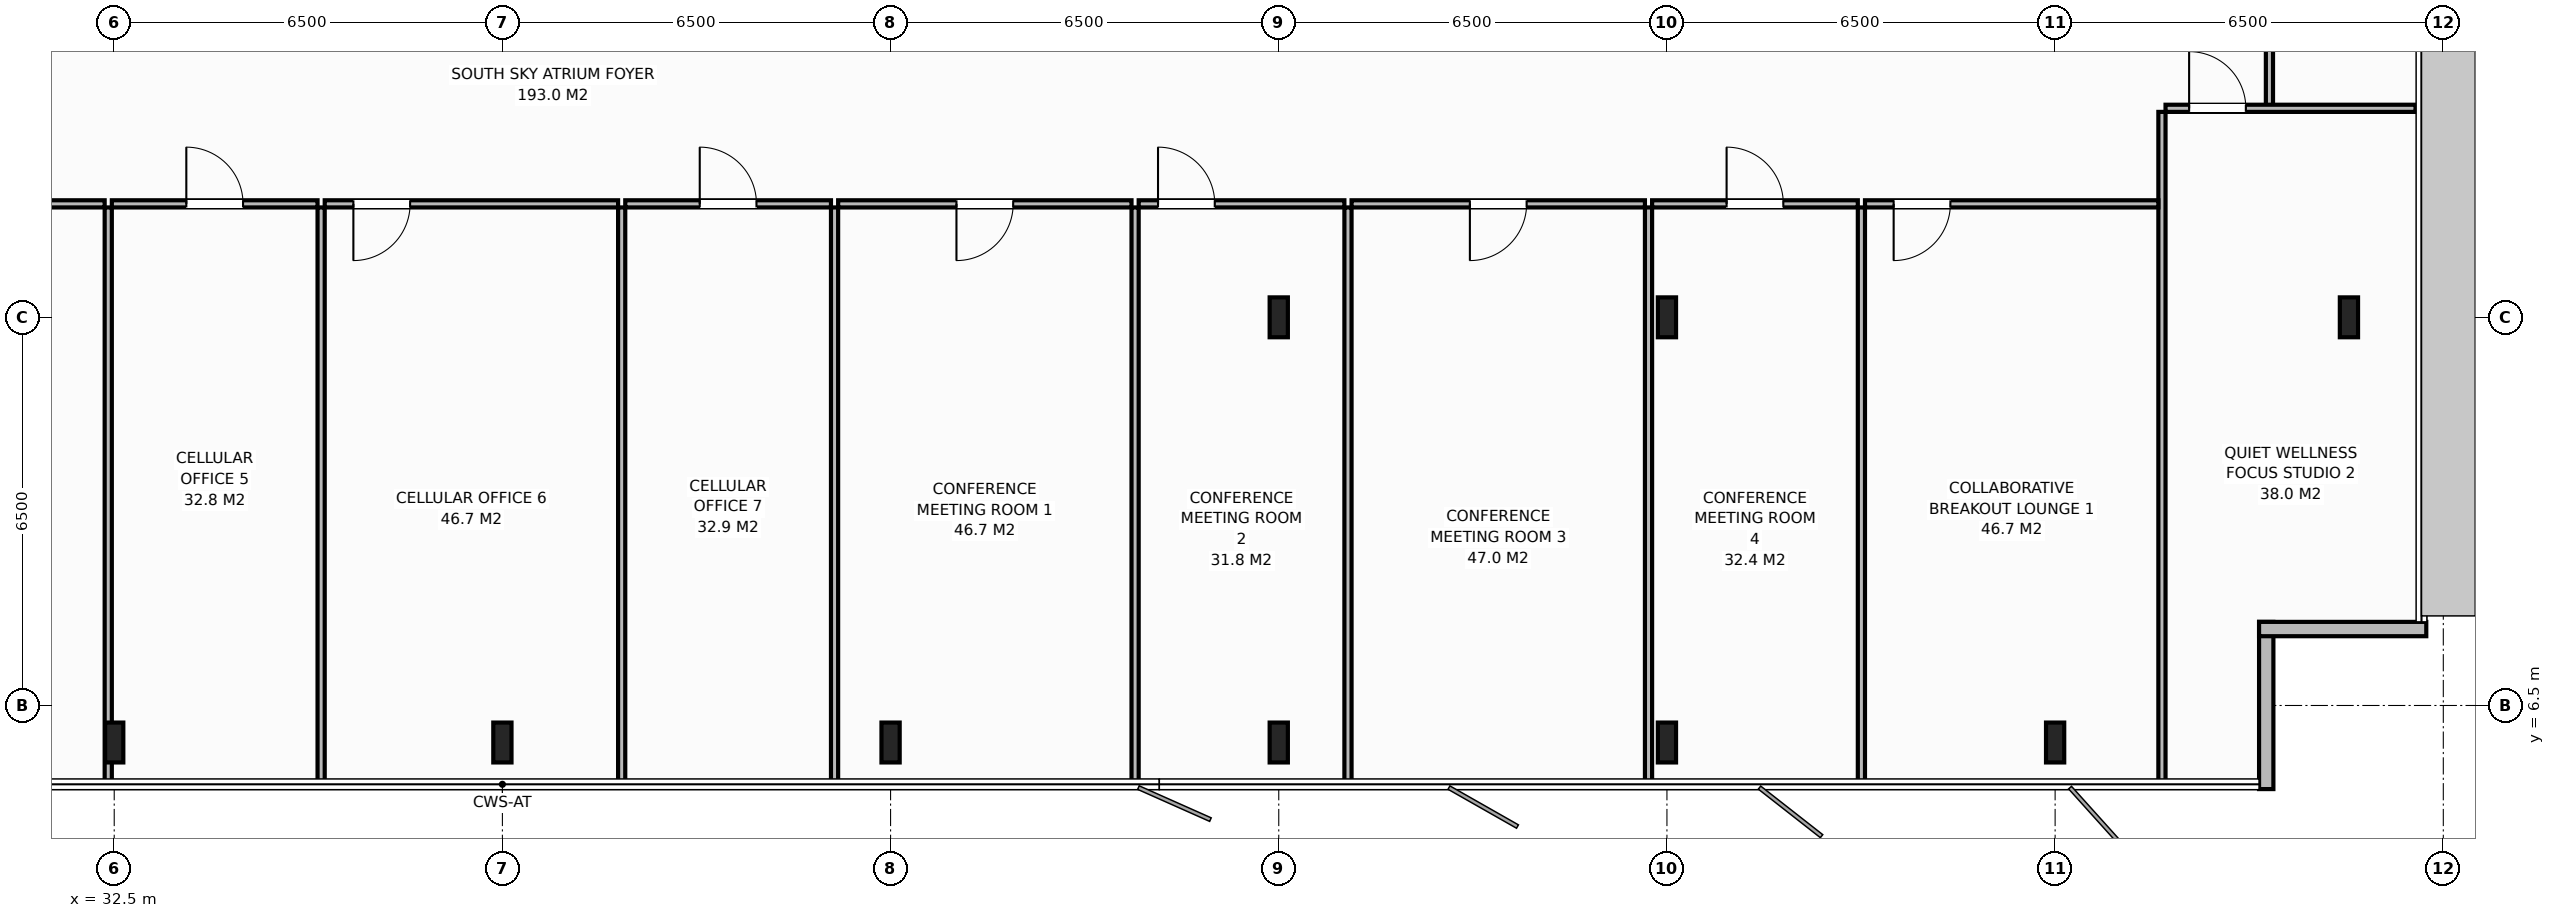
"""IFC4 building model, lengths in metres.
Left out: names, types, materials, properties, quantities, classifications, styles, units other than length and angle.
Written with IfcOpenShell. Run it as: python <this file> out.ifc"""

import sys

from ifc_helpers import new_model, si_unit, direction, frame, frame_2d, origin, origin_2d, place, context, subcontext, project, spatial, rectangle, i_section, extrude, element, fill, save


model = new_model("IFC4")
c1 = context("Model", 3, precision=1e-05, world=origin(), true_north=direction((0.0, 1.0)))
c2 = subcontext(c1, "Body", "Model", "MODEL_VIEW")
j1 = project(units=[si_unit("LENGTHUNIT", "METRE"), si_unit("PLANEANGLEUNIT", "RADIAN")], contexts=[c1])
p1 = place(None, origin())
s1 = spatial("IfcSite", under=j1, at=p1, CompositionType="ELEMENT")
p2 = place(p1, origin())
s2 = spatial("IfcBuilding", under=s1, at=p2, CompositionType="ELEMENT")
p3 = place(p2, frame((0.0, 0.0, 267.0)))
s3 = spatial("IfcBuildingStorey", under=s2, at=p3, CompositionType="ELEMENT", Elevation=267.0)
for number, where, z_axis, x_axis in (
    (1, (58.5, 13.0, 0.0), (0.0, 0.0, 1.0), (1.0, 0.0, 0.0)),
    (2, (52.0, 13.0, 0.0), (0.0, 0.0, 1.0), (1.0, 0.0, 0.0)),
    (3, (32.5, 5.88, 0.0), (0.0, 0.0, 1.0), (1.0, 0.0, 0.0)),
    (4, (39.0, 5.88, 0.0), (0.0, 0.0, 1.0), (1.0, 0.0, 0.0)),
    (5, (45.5, 5.88, 0.0), (0.0, 0.0, 1.0), (1.0, 0.0, 0.0)),
    (6, (52.0, 5.88, 0.0), (0.0, 0.0, 1.0), (1.0, 0.0, 0.0)),
    (7, (58.5, 5.88, 0.0), (0.0, 0.0, 1.0), (1.0, 0.0, 0.0)),
    (8, (65.0, 5.88, 0.0), (0.0, 0.0, 1.0), (1.0, 0.0, 0.0)),
    (9, (69.92, 13.0, 0.0), (0.0, 0.0, 1.0), (1.0, 0.0, 0.0)),
):
    element("IfcColumn", number, at=place(p3, frame(where, z_axis=z_axis, x_axis=x_axis)), inside=s3, PredefinedType="COLUMN", context=c2, shape_type="SweptSolid", body=[
        extrude(i_section(OverallWidth=0.305, OverallDepth=0.668, WebThickness=0.021, FlangeThickness=0.04, at=origin_2d()), origin(), (0.0, 0.0, 1.0), 3.8),
    ])
p4 = place(p3, frame((68.535, 7.9, 0.0), z_axis=(0.0, 0.0, 1.0), x_axis=(0.0, -1.0, 0.0)))
e10 = element("IfcWall", 10, at=p4, inside=s3, PredefinedType="STANDARD", context=c2, shape_type="SweptSolid", body=[
    extrude(rectangle(XDim=2.8, YDim=0.24, at=frame_2d((1.4, 0.0))), origin(), (0.0, 0.0, 1.0), 3.588),
])
p5 = place(p3, frame((71.215, 7.78, 0.0), z_axis=(0.0, 0.0, 1.0), x_axis=(-1.0, 0.0, 0.0)))
e11 = element("IfcWall", 11, at=p5, inside=s3, PredefinedType="STANDARD", context=c2, shape_type="SweptSolid", body=[
    extrude(rectangle(XDim=2.8, YDim=0.24, at=frame_2d((1.4, 0.0))), origin(), (0.0, 0.0, 1.0), 3.588),
])
p6 = place(p3, frame((68.589, 16.5, 0.0), z_axis=(0.0, 0.0, 1.0), x_axis=(0.0, 1.0, 0.0)))
e12 = element("IfcWall", 12, at=p6, inside=s3, PredefinedType="PARTITIONING", context=c2, shape_type="SweptSolid", body=[
    extrude(rectangle(XDim=2.1, YDim=0.12, at=frame_2d((1.05, 0.0))), origin(), (0.0, 0.0, 1.0), 3.588),
])
p7 = place(p3, frame((32.4, 5.12, 0.0), z_axis=(0.0, 0.0, 1.0), x_axis=(0.0, 1.0, 0.0)))
e13 = element("IfcWall", 13, at=p7, inside=s3, PredefinedType="PARTITIONING", context=c2, shape_type="SweptSolid", body=[
    extrude(rectangle(XDim=9.72, YDim=0.12, at=frame_2d((4.86, 0.0))), origin(), (0.0, 0.0, 1.0), 2.788),
])
p8 = place(p3, frame((26.42, 14.9, 0.0), z_axis=(0.0, 0.0, 1.0), x_axis=(1.0, 0.0, 0.0)))
e14 = element("IfcWall", 14, at=p8, inside=s3, PredefinedType="PARTITIONING", context=c2, shape_type="SweptSolid", body=[
    extrude(rectangle(XDim=5.92, YDim=0.12, at=frame_2d((2.96, 0.0))), origin(), (0.0, 0.0, 1.0), 3.588),
])
p9 = place(p8, frame((2.485, 0.0, 0.0)))
e15 = element("IfcOpeningElement", 15, at=p9, cuts=e14, PredefinedType="OPENING", context=c2, shape_type="SweptSolid", body=[
    extrude(rectangle(XDim=0.95, YDim=2.15, at=frame_2d((0.475, 1.075))), frame((0.0, 0.07, 0.0), z_axis=(0.0, -1.0, 0.0), x_axis=(1.0, 0.0, 0.0)), (0.0, 0.0, 1.0), 0.14),
])
p10 = place(p3, frame((35.965, 5.12, 0.0), z_axis=(0.0, 0.0, 1.0), x_axis=(0.0, 1.0, 0.0)))
e16 = element("IfcWall", 16, at=p10, inside=s3, PredefinedType="PARTITIONING", context=c2, shape_type="SweptSolid", body=[
    extrude(rectangle(XDim=9.72, YDim=0.12, at=frame_2d((4.86, 0.0))), origin(), (0.0, 0.0, 1.0), 3.588),
])
p11 = place(p3, frame((32.46, 14.9, 0.0), z_axis=(0.0, 0.0, 1.0), x_axis=(1.0, 0.0, 0.0)))
e17 = element("IfcWall", 17, at=p11, inside=s3, PredefinedType="PARTITIONING", context=c2, shape_type="SweptSolid", body=[
    extrude(rectangle(XDim=3.445, YDim=0.12, at=frame_2d((1.722, 0.0))), origin(), (0.0, 0.0, 1.0), 3.588),
])
p12 = place(p11, frame((1.247, 0.0, 0.0)))
e18 = element("IfcOpeningElement", 18, at=p12, cuts=e17, PredefinedType="OPENING", context=c2, shape_type="SweptSolid", body=[
    extrude(rectangle(XDim=0.95, YDim=2.15, at=frame_2d((0.475, 1.075))), frame((0.0, 0.07, 0.0), z_axis=(0.0, -1.0, 0.0), x_axis=(1.0, 0.0, 0.0)), (0.0, 0.0, 1.0), 0.14),
])
p13 = place(p3, frame((40.997, 5.12, 0.0), z_axis=(0.0, 0.0, 1.0), x_axis=(0.0, 1.0, 0.0)))
e19 = element("IfcWall", 19, at=p13, inside=s3, PredefinedType="PARTITIONING", context=c2, shape_type="SweptSolid", body=[
    extrude(rectangle(XDim=9.72, YDim=0.12, at=frame_2d((4.86, 0.0))), origin(), (0.0, 0.0, 1.0), 3.588),
])
p14 = place(p3, frame((36.025, 14.9, 0.0), z_axis=(0.0, 0.0, 1.0), x_axis=(1.0, 0.0, 0.0)))
e20 = element("IfcWall", 20, at=p14, inside=s3, PredefinedType="PARTITIONING", context=c2, shape_type="SweptSolid", body=[
    extrude(rectangle(XDim=4.913, YDim=0.12, at=frame_2d((2.456, 0.0))), origin(), (0.0, 0.0, 1.0), 3.588),
])
p15 = place(p14, frame((0.48, 0.0, 0.0)))
e21 = element("IfcOpeningElement", 21, at=p15, cuts=e20, PredefinedType="OPENING", context=c2, shape_type="SweptSolid", body=[
    extrude(rectangle(XDim=0.95, YDim=2.15, at=frame_2d((0.475, 1.075))), frame((0.0, 0.07, 0.0), z_axis=(0.0, -1.0, 0.0), x_axis=(1.0, 0.0, 0.0)), (0.0, 0.0, 1.0), 0.14),
])
p16 = place(p3, frame((44.562, 5.12, 0.0), z_axis=(0.0, 0.0, 1.0), x_axis=(0.0, 1.0, 0.0)))
e22 = element("IfcWall", 22, at=p16, inside=s3, PredefinedType="PARTITIONING", context=c2, shape_type="SweptSolid", body=[
    extrude(rectangle(XDim=9.72, YDim=0.12, at=frame_2d((4.86, 0.0))), origin(), (0.0, 0.0, 1.0), 3.588),
])
p17 = place(p3, frame((41.057, 14.9, 0.0), z_axis=(0.0, 0.0, 1.0), x_axis=(1.0, 0.0, 0.0)))
e23 = element("IfcWall", 23, at=p17, inside=s3, PredefinedType="PARTITIONING", context=c2, shape_type="SweptSolid", body=[
    extrude(rectangle(XDim=3.445, YDim=0.12, at=frame_2d((1.722, 0.0))), origin(), (0.0, 0.0, 1.0), 3.588),
])
p18 = place(p17, frame((1.247, 0.0, 0.0)))
e24 = element("IfcOpeningElement", 24, at=p18, cuts=e23, PredefinedType="OPENING", context=c2, shape_type="SweptSolid", body=[
    extrude(rectangle(XDim=0.95, YDim=2.15, at=frame_2d((0.475, 1.075))), frame((0.0, 0.07, 0.0), z_axis=(0.0, -1.0, 0.0), x_axis=(1.0, 0.0, 0.0)), (0.0, 0.0, 1.0), 0.14),
])
p19 = place(p3, frame((49.594, 5.12, 0.0), z_axis=(0.0, 0.0, 1.0), x_axis=(0.0, 1.0, 0.0)))
e25 = element("IfcWall", 25, at=p19, inside=s3, PredefinedType="PARTITIONING", context=c2, shape_type="SweptSolid", body=[
    extrude(rectangle(XDim=9.72, YDim=0.12, at=frame_2d((4.86, 0.0))), origin(), (0.0, 0.0, 1.0), 3.588),
])
p20 = place(p3, frame((44.622, 14.9, 0.0), z_axis=(0.0, 0.0, 1.0), x_axis=(1.0, 0.0, 0.0)))
e26 = element("IfcWall", 26, at=p20, inside=s3, PredefinedType="PARTITIONING", context=c2, shape_type="SweptSolid", body=[
    extrude(rectangle(XDim=4.913, YDim=0.12, at=frame_2d((2.456, 0.0))), origin(), (0.0, 0.0, 1.0), 3.588),
])
p21 = place(p20, frame((1.981, 0.0, 0.0)))
e27 = element("IfcOpeningElement", 27, at=p21, cuts=e26, PredefinedType="OPENING", context=c2, shape_type="SweptSolid", body=[
    extrude(rectangle(XDim=0.95, YDim=2.15, at=frame_2d((0.475, 1.075))), frame((0.0, 0.07, 0.0), z_axis=(0.0, -1.0, 0.0), x_axis=(1.0, 0.0, 0.0)), (0.0, 0.0, 1.0), 0.14),
])
p22 = place(p3, frame((53.159, 5.12, 0.0), z_axis=(0.0, 0.0, 1.0), x_axis=(0.0, 1.0, 0.0)))
e28 = element("IfcWall", 28, at=p22, inside=s3, PredefinedType="PARTITIONING", context=c2, shape_type="SweptSolid", body=[
    extrude(rectangle(XDim=9.72, YDim=0.12, at=frame_2d((4.86, 0.0))), origin(), (0.0, 0.0, 1.0), 3.588),
])
p23 = place(p3, frame((49.654, 14.9, 0.0), z_axis=(0.0, 0.0, 1.0), x_axis=(1.0, 0.0, 0.0)))
e29 = element("IfcWall", 29, at=p23, inside=s3, PredefinedType="PARTITIONING", context=c2, shape_type="SweptSolid", body=[
    extrude(rectangle(XDim=3.445, YDim=0.12, at=frame_2d((1.722, 0.0))), origin(), (0.0, 0.0, 1.0), 3.588),
])
p24 = place(p23, frame((0.324, 0.0, 0.0)))
e30 = element("IfcOpeningElement", 30, at=p24, cuts=e29, PredefinedType="OPENING", context=c2, shape_type="SweptSolid", body=[
    extrude(rectangle(XDim=0.95, YDim=2.15, at=frame_2d((0.475, 1.075))), frame((0.0, 0.07, 0.0), z_axis=(0.0, -1.0, 0.0), x_axis=(1.0, 0.0, 0.0)), (0.0, 0.0, 1.0), 0.14),
])
p25 = place(p3, frame((58.192, 5.12, 0.0), z_axis=(0.0, 0.0, 1.0), x_axis=(0.0, 1.0, 0.0)))
e31 = element("IfcWall", 31, at=p25, inside=s3, PredefinedType="PARTITIONING", context=c2, shape_type="SweptSolid", body=[
    extrude(rectangle(XDim=9.72, YDim=0.12, at=frame_2d((4.86, 0.0))), origin(), (0.0, 0.0, 1.0), 3.588),
])
p26 = place(p3, frame((53.219, 14.9, 0.0), z_axis=(0.0, 0.0, 1.0), x_axis=(1.0, 0.0, 0.0)))
e32 = element("IfcWall", 32, at=p26, inside=s3, PredefinedType="PARTITIONING", context=c2, shape_type="SweptSolid", body=[
    extrude(rectangle(XDim=4.913, YDim=0.12, at=frame_2d((2.456, 0.0))), origin(), (0.0, 0.0, 1.0), 3.588),
])
p27 = place(p26, frame((1.981, 0.0, 0.0)))
e33 = element("IfcOpeningElement", 33, at=p27, cuts=e32, PredefinedType="OPENING", context=c2, shape_type="SweptSolid", body=[
    extrude(rectangle(XDim=0.95, YDim=2.15, at=frame_2d((0.475, 1.075))), frame((0.0, 0.07, 0.0), z_axis=(0.0, -1.0, 0.0), x_axis=(1.0, 0.0, 0.0)), (0.0, 0.0, 1.0), 0.14),
])
p28 = place(p3, frame((61.756, 5.12, 0.0), z_axis=(0.0, 0.0, 1.0), x_axis=(0.0, 1.0, 0.0)))
e34 = element("IfcWall", 34, at=p28, inside=s3, PredefinedType="PARTITIONING", context=c2, shape_type="SweptSolid", body=[
    extrude(rectangle(XDim=9.72, YDim=0.12, at=frame_2d((4.86, 0.0))), origin(), (0.0, 0.0, 1.0), 3.588),
])
p29 = place(p3, frame((58.252, 14.9, 0.0), z_axis=(0.0, 0.0, 1.0), x_axis=(1.0, 0.0, 0.0)))
e35 = element("IfcWall", 35, at=p29, inside=s3, PredefinedType="PARTITIONING", context=c2, shape_type="SweptSolid", body=[
    extrude(rectangle(XDim=3.445, YDim=0.12, at=frame_2d((1.722, 0.0))), origin(), (0.0, 0.0, 1.0), 3.588),
])
p30 = place(p29, frame((1.247, 0.0, 0.0)))
e36 = element("IfcOpeningElement", 36, at=p30, cuts=e35, PredefinedType="OPENING", context=c2, shape_type="SweptSolid", body=[
    extrude(rectangle(XDim=0.95, YDim=2.15, at=frame_2d((0.475, 1.075))), frame((0.0, 0.07, 0.0), z_axis=(0.0, -1.0, 0.0), x_axis=(1.0, 0.0, 0.0)), (0.0, 0.0, 1.0), 0.14),
])
p31 = place(p3, frame((66.789, 5.12, 0.0), z_axis=(0.0, 0.0, 1.0), x_axis=(0.0, 1.0, 0.0)))
e37 = element("IfcWall", 37, at=p31, inside=s3, PredefinedType="PARTITIONING", context=c2, shape_type="SweptSolid", body=[
    extrude(rectangle(XDim=11.32, YDim=0.12, at=frame_2d((5.66, 0.0))), origin(), (0.0, 0.0, 1.0), 3.588),
])
p32 = place(p3, frame((61.816, 14.9, 0.0), z_axis=(0.0, 0.0, 1.0), x_axis=(1.0, 0.0, 0.0)))
e38 = element("IfcWall", 38, at=p32, inside=s3, PredefinedType="PARTITIONING", context=c2, shape_type="SweptSolid", body=[
    extrude(rectangle(XDim=4.912, YDim=0.12, at=frame_2d((2.456, 0.0))), origin(), (0.0, 0.0, 1.0), 3.588),
])
p33 = place(p32, frame((0.48, 0.0, 0.0)))
e39 = element("IfcOpeningElement", 39, at=p33, cuts=e38, PredefinedType="OPENING", context=c2, shape_type="SweptSolid", body=[
    extrude(rectangle(XDim=0.95, YDim=2.15, at=frame_2d((0.475, 1.075))), frame((0.0, 0.07, 0.0), z_axis=(0.0, -1.0, 0.0), x_axis=(1.0, 0.0, 0.0)), (0.0, 0.0, 1.0), 0.14),
])
p34 = place(p3, frame((66.849, 16.5, 0.0), z_axis=(0.0, 0.0, 1.0), x_axis=(1.0, 0.0, 0.0)))
e40 = element("IfcWall", 40, at=p34, inside=s3, PredefinedType="PARTITIONING", context=c2, shape_type="SweptSolid", body=[
    extrude(rectangle(XDim=4.186, YDim=0.12, at=frame_2d((2.093, 0.0))), origin(), (0.0, 0.0, 1.0), 3.588),
])
p35 = place(p34, frame((0.395, 0.0, 0.0)))
e41 = element("IfcOpeningElement", 41, at=p35, cuts=e40, PredefinedType="OPENING", context=c2, shape_type="SweptSolid", body=[
    extrude(rectangle(XDim=0.95, YDim=2.15, at=frame_2d((0.475, 1.075))), frame((0.0, 0.07, 0.0), z_axis=(0.0, -1.0, 0.0), x_axis=(1.0, 0.0, 0.0)), (0.0, 0.0, 1.0), 0.14),
])
p36 = place(p12, origin())
e42 = element("IfcDoor", 42, at=p36, inside=s3, OperationType="SINGLE_SWING_LEFT", PredefinedType="DOOR", context=c2, shape_type="SweptSolid", body=[
    extrude(rectangle(XDim=0.95, YDim=2.15, at=frame_2d((0.475, 1.075))), frame((0.0, 0.025, 0.0), z_axis=(0.0, -1.0, 0.0), x_axis=(1.0, 0.0, 0.0)), (0.0, 0.0, 1.0), 0.05),
])
fill(e18, e42)
p37 = place(p15, origin())
e43 = element("IfcDoor", 43, at=p37, inside=s3, OperationType="SINGLE_SWING_RIGHT", PredefinedType="DOOR", context=c2, shape_type="SweptSolid", body=[
    extrude(rectangle(XDim=0.95, YDim=2.15, at=frame_2d((0.475, 1.075))), frame((0.0, 0.025, 0.0), z_axis=(0.0, -1.0, 0.0), x_axis=(1.0, 0.0, 0.0)), (0.0, 0.0, 1.0), 0.05),
])
fill(e21, e43)
p38 = place(p18, origin())
e44 = element("IfcDoor", 44, at=p38, inside=s3, OperationType="SINGLE_SWING_LEFT", PredefinedType="DOOR", context=c2, shape_type="SweptSolid", body=[
    extrude(rectangle(XDim=0.95, YDim=2.15, at=frame_2d((0.475, 1.075))), frame((0.0, 0.025, 0.0), z_axis=(0.0, -1.0, 0.0), x_axis=(1.0, 0.0, 0.0)), (0.0, 0.0, 1.0), 0.05),
])
fill(e24, e44)
p39 = place(p21, origin())
e45 = element("IfcDoor", 45, at=p39, inside=s3, OperationType="SINGLE_SWING_RIGHT", PredefinedType="DOOR", context=c2, shape_type="SweptSolid", body=[
    extrude(rectangle(XDim=0.95, YDim=2.15, at=frame_2d((0.475, 1.075))), frame((0.0, 0.025, 0.0), z_axis=(0.0, -1.0, 0.0), x_axis=(1.0, 0.0, 0.0)), (0.0, 0.0, 1.0), 0.05),
])
fill(e27, e45)
p40 = place(p24, origin())
e46 = element("IfcDoor", 46, at=p40, inside=s3, OperationType="SINGLE_SWING_LEFT", PredefinedType="DOOR", context=c2, shape_type="SweptSolid", body=[
    extrude(rectangle(XDim=0.95, YDim=2.15, at=frame_2d((0.475, 1.075))), frame((0.0, 0.025, 0.0), z_axis=(0.0, -1.0, 0.0), x_axis=(1.0, 0.0, 0.0)), (0.0, 0.0, 1.0), 0.05),
])
fill(e30, e46)
p41 = place(p27, origin())
e47 = element("IfcDoor", 47, at=p41, inside=s3, OperationType="SINGLE_SWING_RIGHT", PredefinedType="DOOR", context=c2, shape_type="SweptSolid", body=[
    extrude(rectangle(XDim=0.95, YDim=2.15, at=frame_2d((0.475, 1.075))), frame((0.0, 0.025, 0.0), z_axis=(0.0, -1.0, 0.0), x_axis=(1.0, 0.0, 0.0)), (0.0, 0.0, 1.0), 0.05),
])
fill(e33, e47)
p42 = place(p30, origin())
e48 = element("IfcDoor", 48, at=p42, inside=s3, OperationType="SINGLE_SWING_LEFT", PredefinedType="DOOR", context=c2, shape_type="SweptSolid", body=[
    extrude(rectangle(XDim=0.95, YDim=2.15, at=frame_2d((0.475, 1.075))), frame((0.0, 0.025, 0.0), z_axis=(0.0, -1.0, 0.0), x_axis=(1.0, 0.0, 0.0)), (0.0, 0.0, 1.0), 0.05),
])
fill(e36, e48)
p43 = place(p33, origin())
e49 = element("IfcDoor", 49, at=p43, inside=s3, OperationType="SINGLE_SWING_RIGHT", PredefinedType="DOOR", context=c2, shape_type="SweptSolid", body=[
    extrude(rectangle(XDim=0.95, YDim=2.15, at=frame_2d((0.475, 1.075))), frame((0.0, 0.025, 0.0), z_axis=(0.0, -1.0, 0.0), x_axis=(1.0, 0.0, 0.0)), (0.0, 0.0, 1.0), 0.05),
])
fill(e39, e49)
p44 = place(p35, origin())
e50 = element("IfcDoor", 50, at=p44, inside=s3, OperationType="SINGLE_SWING_LEFT", PredefinedType="DOOR", context=c2, shape_type="SweptSolid", body=[
    extrude(rectangle(XDim=0.95, YDim=2.15, at=frame_2d((0.475, 1.075))), frame((0.0, 0.025, 0.0), z_axis=(0.0, -1.0, 0.0), x_axis=(1.0, 0.0, 0.0)), (0.0, 0.0, 1.0), 0.05),
])
fill(e41, e50)
save(model, sys.argv[1])
